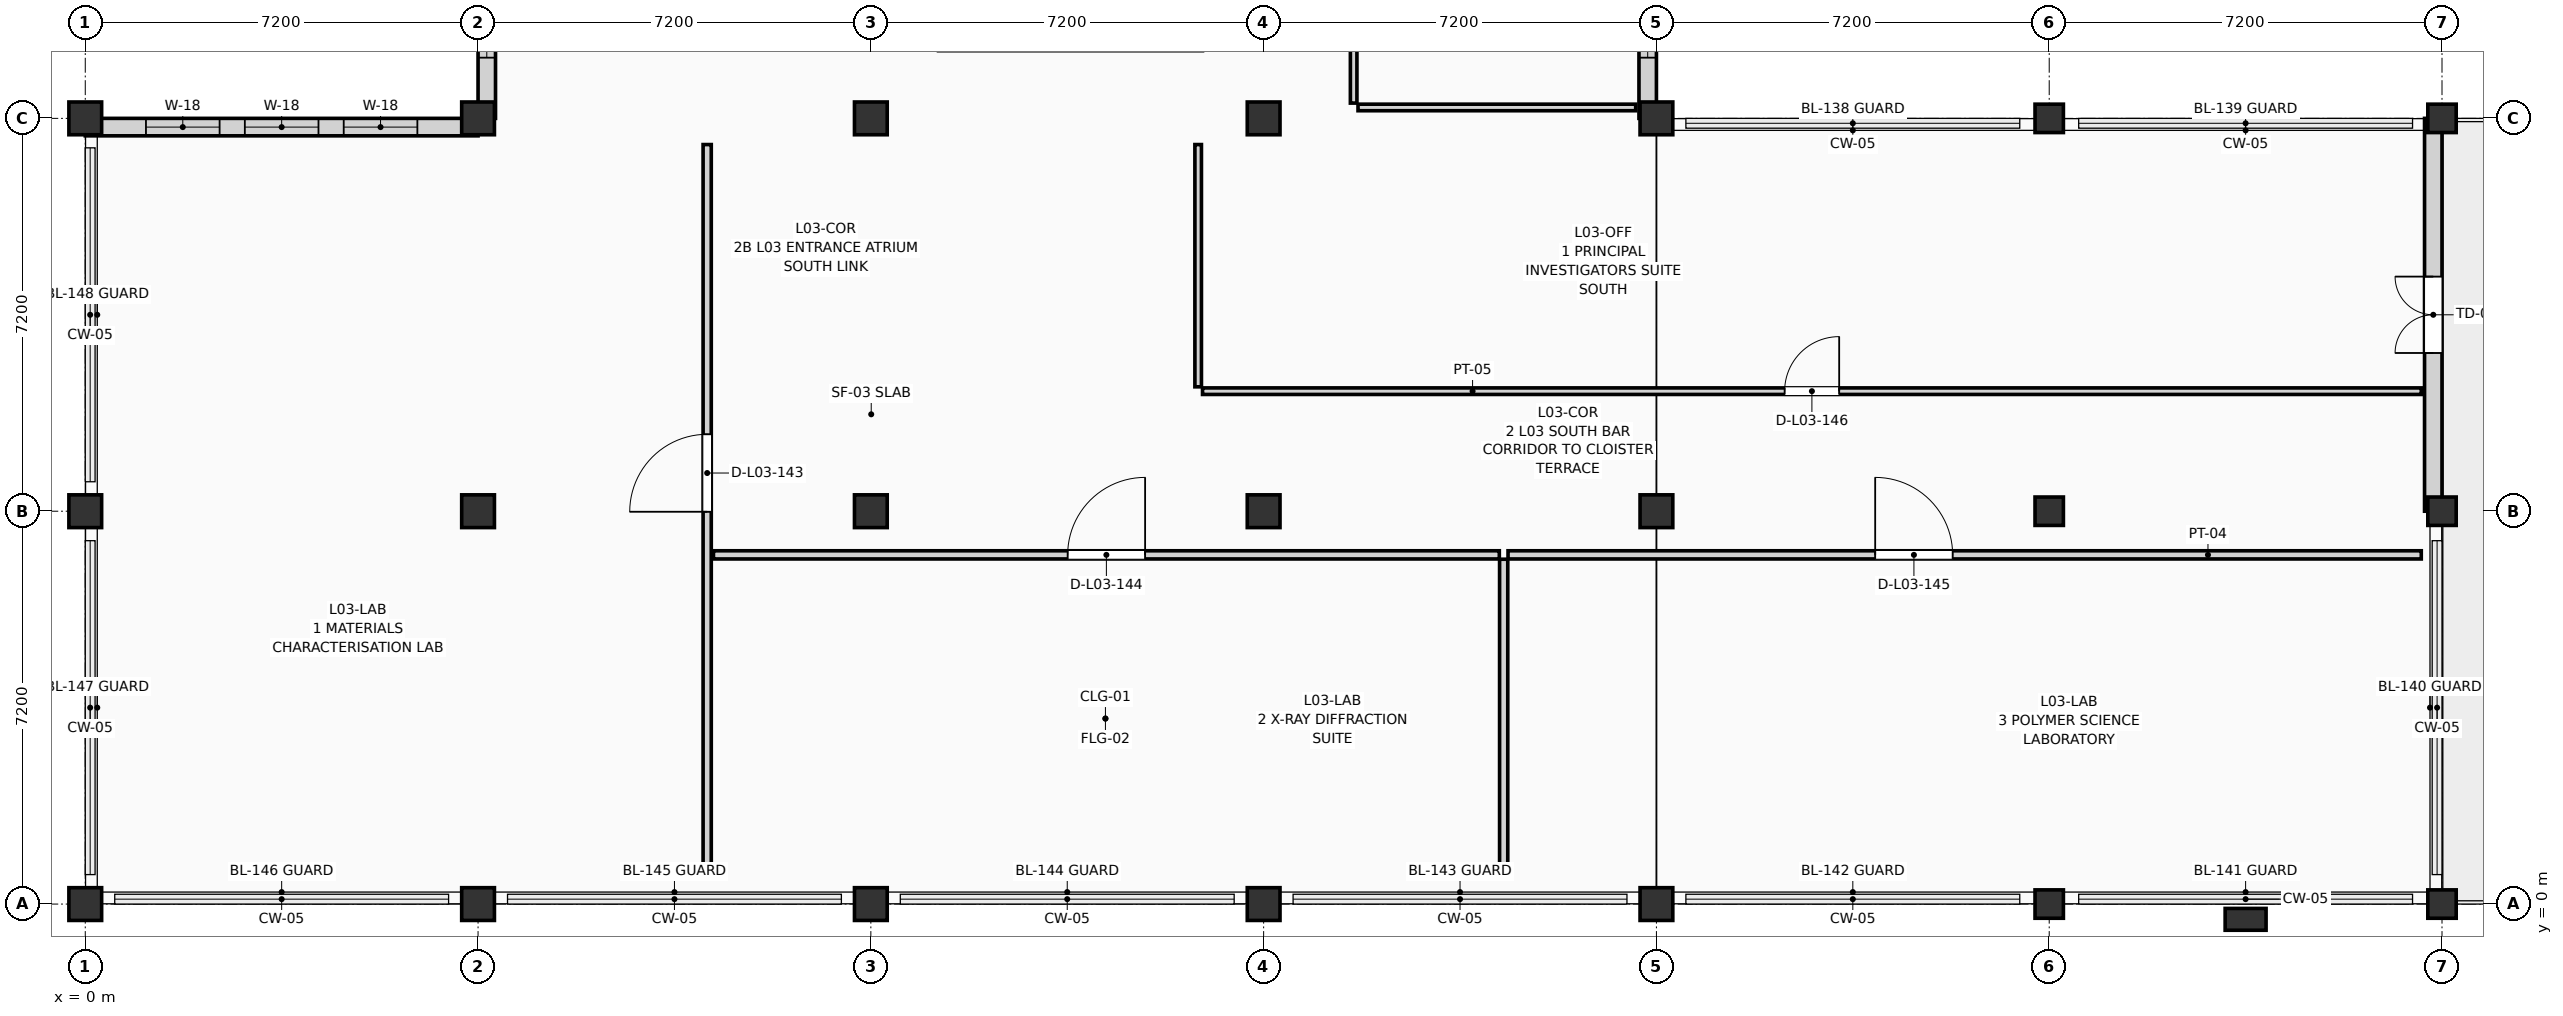
"""IFC4 building model, lengths in metres.
Left out: names, types, materials, properties, quantities, classifications, styles, units other than length and angle.
Written with IfcOpenShell. Run it as: python <this file> out.ifc"""

import sys

from ifc_helpers import new_model, si_unit, direction, frame, frame_2d, origin, origin_2d, place, context, subcontext, project, spatial, rectangle, extrude, element, fill, save


model = new_model("IFC4")
c1 = context("Model", 3, precision=1e-05, world=origin(), true_north=direction((0.0, 1.0)))
c2 = subcontext(c1, "Body", "Model", "MODEL_VIEW")
j1 = project(units=[si_unit("LENGTHUNIT", "METRE"), si_unit("PLANEANGLEUNIT", "RADIAN")], contexts=[c1])
p1 = place(None, origin())
s1 = spatial("IfcSite", under=j1, at=p1, CompositionType="ELEMENT")
p2 = place(p1, origin())
s2 = spatial("IfcBuilding", under=s1, at=p2, CompositionType="ELEMENT")
p3 = place(p2, frame((0.0, 0.0, 12.15)))
s3 = spatial("IfcBuildingStorey", under=s2, at=p3, CompositionType="ELEMENT", Elevation=12.15)
for number, where, z_axis, x_axis in (
    (1, (0.0, 0.0, 0.0), (0.0, 0.0, 1.0), (1.0, 0.0, 0.0)),
    (2, (0.0, 7.2, 0.0), (0.0, 0.0, 1.0), (1.0, 0.0, 0.0)),
    (3, (0.0, 14.4, 0.0), (0.0, 0.0, 1.0), (1.0, 0.0, 0.0)),
    (4, (7.2, 0.0, 0.0), (0.0, 0.0, 1.0), (1.0, 0.0, 0.0)),
    (5, (7.2, 7.2, 0.0), (0.0, 0.0, 1.0), (1.0, 0.0, 0.0)),
    (6, (7.2, 14.4, 0.0), (0.0, 0.0, 1.0), (1.0, 0.0, 0.0)),
    (7, (14.4, 0.0, 0.0), (0.0, 0.0, 1.0), (1.0, 0.0, 0.0)),
    (8, (14.4, 7.2, 0.0), (0.0, 0.0, 1.0), (1.0, 0.0, 0.0)),
    (9, (14.4, 14.4, 0.0), (0.0, 0.0, 1.0), (1.0, 0.0, 0.0)),
    (10, (21.6, 0.0, 0.0), (0.0, 0.0, 1.0), (1.0, 0.0, 0.0)),
    (11, (21.6, 7.2, 0.0), (0.0, 0.0, 1.0), (1.0, 0.0, 0.0)),
    (12, (21.6, 14.4, 0.0), (0.0, 0.0, 1.0), (1.0, 0.0, 0.0)),
    (13, (28.8, 0.0, 0.0), (0.0, 0.0, 1.0), (1.0, 0.0, 0.0)),
    (14, (28.8, 7.2, 0.0), (0.0, 0.0, 1.0), (1.0, 0.0, 0.0)),
    (15, (28.8, 14.4, 0.0), (0.0, 0.0, 1.0), (1.0, 0.0, 0.0)),
):
    element("IfcColumn", number, at=place(p3, frame(where, z_axis=z_axis, x_axis=x_axis)), inside=s3, PredefinedType="COLUMN", context=c2, shape_type="SweptSolid", body=[
        extrude(rectangle(XDim=0.6, YDim=0.6, at=origin_2d()), origin(), (0.0, 0.0, 1.0), 3.6),
    ])
for number, where, z_axis, x_axis in (
    (16, (36.0, 0.0, 0.0), (0.0, 0.0, 1.0), (1.0, 0.0, 0.0)),
    (17, (36.0, 7.2, 0.0), (0.0, 0.0, 1.0), (1.0, 0.0, 0.0)),
    (18, (36.0, 14.4, 0.0), (0.0, 0.0, 1.0), (1.0, 0.0, 0.0)),
    (19, (43.2, 0.0, 0.0), (0.0, 0.0, 1.0), (1.0, 0.0, 0.0)),
    (20, (43.2, 7.2, 0.0), (0.0, 0.0, 1.0), (1.0, 0.0, 0.0)),
    (21, (43.2, 14.4, 0.0), (0.0, 0.0, 1.0), (1.0, 0.0, 0.0)),
):
    element("IfcColumn", number, at=place(p3, frame(where, z_axis=z_axis, x_axis=x_axis)), inside=s3, PredefinedType="COLUMN", context=c2, shape_type="SweptSolid", body=[
        extrude(rectangle(XDim=0.52, YDim=0.52, at=origin_2d()), origin(), (0.0, 0.0, 1.0), 3.6),
    ])
p4 = place(p3, frame((39.6, -0.28, 0.0), z_axis=(0.0, 0.0, 1.0), x_axis=(0.0, 1.0, 0.0)))
e22 = element("IfcColumn", 22, at=p4, inside=s3, PredefinedType="PILASTER", context=c2, shape_type="SweptSolid", body=[
    extrude(rectangle(XDim=0.4, YDim=0.75, at=origin_2d()), origin(), (0.0, 0.0, 1.0), 3.6),
])
p5 = place(p3, frame((7.36, 14.4, 0.0), z_axis=(0.0, 0.0, 1.0), x_axis=(0.0, 1.0, 0.0)))
e23 = element("IfcWall", 23, at=p5, inside=s3, PredefinedType="SOLIDWALL", context=c2, shape_type="SweptSolid", body=[
    extrude(rectangle(XDim=7.2, YDim=0.32, at=frame_2d((3.6, 0.0))), origin(), (0.0, 0.0, 1.0), 2.84),
])
p6 = place(p5, frame((1.113, 0.0, 0.18)))
e24 = element("IfcOpeningElement", 24, at=p6, cuts=e23, PredefinedType="OPENING", context=c2, shape_type="SweptSolid", body=[
    extrude(rectangle(XDim=1.35, YDim=2.45, at=frame_2d((0.675, 1.225))), frame((0.0, 0.172, 0.0), z_axis=(0.0, -1.0, 0.0), x_axis=(1.0, 0.0, 0.0)), (0.0, 0.0, 1.0), 0.344),
])
p7 = place(p5, frame((2.925, 0.0, 0.18)))
e25 = element("IfcOpeningElement", 25, at=p7, cuts=e23, PredefinedType="OPENING", context=c2, shape_type="SweptSolid", body=[
    extrude(rectangle(XDim=1.35, YDim=2.45, at=frame_2d((0.675, 1.225))), frame((0.0, 0.172, 0.0), z_axis=(0.0, -1.0, 0.0), x_axis=(1.0, 0.0, 0.0)), (0.0, 0.0, 1.0), 0.344),
])
p8 = place(p5, frame((4.738, 0.0, 0.18)))
e26 = element("IfcOpeningElement", 26, at=p8, cuts=e23, PredefinedType="OPENING", context=c2, shape_type="SweptSolid", body=[
    extrude(rectangle(XDim=1.35, YDim=2.45, at=frame_2d((0.675, 1.225))), frame((0.0, 0.172, 0.0), z_axis=(0.0, -1.0, 0.0), x_axis=(1.0, 0.0, 0.0)), (0.0, 0.0, 1.0), 0.344),
])
p9 = place(p3, frame((28.64, 14.4, 0.0), z_axis=(0.0, 0.0, 1.0), x_axis=(0.0, 1.0, 0.0)))
e27 = element("IfcWall", 27, at=p9, inside=s3, PredefinedType="SOLIDWALL", context=c2, shape_type="SweptSolid", body=[
    extrude(rectangle(XDim=7.2, YDim=0.32, at=frame_2d((3.6, 0.0))), origin(), (0.0, 0.0, 1.0), 2.84),
])
p10 = place(p9, frame((1.113, 0.0, 0.18)))
e28 = element("IfcOpeningElement", 28, at=p10, cuts=e27, PredefinedType="OPENING", context=c2, shape_type="SweptSolid", body=[
    extrude(rectangle(XDim=1.35, YDim=2.45, at=frame_2d((0.675, 1.225))), frame((0.0, 0.172, 0.0), z_axis=(0.0, -1.0, 0.0), x_axis=(1.0, 0.0, 0.0)), (0.0, 0.0, 1.0), 0.344),
])
p11 = place(p9, frame((2.925, 0.0, 0.18)))
e29 = element("IfcOpeningElement", 29, at=p11, cuts=e27, PredefinedType="OPENING", context=c2, shape_type="SweptSolid", body=[
    extrude(rectangle(XDim=1.35, YDim=2.45, at=frame_2d((0.675, 1.225))), frame((0.0, 0.172, 0.0), z_axis=(0.0, -1.0, 0.0), x_axis=(1.0, 0.0, 0.0)), (0.0, 0.0, 1.0), 0.344),
])
p12 = place(p9, frame((4.738, 0.0, 0.18)))
e30 = element("IfcOpeningElement", 30, at=p12, cuts=e27, PredefinedType="OPENING", context=c2, shape_type="SweptSolid", body=[
    extrude(rectangle(XDim=1.35, YDim=2.45, at=frame_2d((0.675, 1.225))), frame((0.0, 0.172, 0.0), z_axis=(0.0, -1.0, 0.0), x_axis=(1.0, 0.0, 0.0)), (0.0, 0.0, 1.0), 0.344),
])
p13 = place(p3, frame((43.04, 7.2, 0.0), z_axis=(0.0, 0.0, 1.0), x_axis=(0.0, 1.0, 0.0)))
e31 = element("IfcWall", 31, at=p13, inside=s3, PredefinedType="SOLIDWALL", context=c2, shape_type="SweptSolid", body=[
    extrude(rectangle(XDim=7.2, YDim=0.32, at=frame_2d((3.6, 0.0))), origin(), (0.0, 0.0, 1.0), 2.84),
])
p14 = place(p13, frame((2.9, 0.0, 0.0)))
e32 = element("IfcOpeningElement", 32, at=p14, cuts=e31, PredefinedType="OPENING", context=c2, shape_type="SweptSolid", body=[
    extrude(rectangle(XDim=1.4, YDim=2.2, at=frame_2d((0.7, 1.1))), frame((0.0, 0.172, 0.0), z_axis=(0.0, -1.0, 0.0), x_axis=(1.0, 0.0, 0.0)), (0.0, 0.0, 1.0), 0.344),
])
p15 = place(p3, frame((0.0, 14.24, 0.0), z_axis=(0.0, 0.0, 1.0), x_axis=(1.0, 0.0, 0.0)))
e33 = element("IfcWall", 33, at=p15, inside=s3, PredefinedType="SOLIDWALL", context=c2, shape_type="SweptSolid", body=[
    extrude(rectangle(XDim=7.2, YDim=0.32, at=frame_2d((3.6, 0.0))), origin(), (0.0, 0.0, 1.0), 2.84),
])
p16 = place(p15, frame((1.113, 0.0, 0.18)))
e34 = element("IfcOpeningElement", 34, at=p16, cuts=e33, PredefinedType="OPENING", context=c2, shape_type="SweptSolid", body=[
    extrude(rectangle(XDim=1.35, YDim=2.45, at=frame_2d((0.675, 1.225))), frame((0.0, 0.172, 0.0), z_axis=(0.0, -1.0, 0.0), x_axis=(1.0, 0.0, 0.0)), (0.0, 0.0, 1.0), 0.344),
])
p17 = place(p15, frame((2.925, 0.0, 0.18)))
e35 = element("IfcOpeningElement", 35, at=p17, cuts=e33, PredefinedType="OPENING", context=c2, shape_type="SweptSolid", body=[
    extrude(rectangle(XDim=1.35, YDim=2.45, at=frame_2d((0.675, 1.225))), frame((0.0, 0.172, 0.0), z_axis=(0.0, -1.0, 0.0), x_axis=(1.0, 0.0, 0.0)), (0.0, 0.0, 1.0), 0.344),
])
p18 = place(p15, frame((4.738, 0.0, 0.18)))
e36 = element("IfcOpeningElement", 36, at=p18, cuts=e33, PredefinedType="OPENING", context=c2, shape_type="SweptSolid", body=[
    extrude(rectangle(XDim=1.35, YDim=2.45, at=frame_2d((0.675, 1.225))), frame((0.0, 0.172, 0.0), z_axis=(0.0, -1.0, 0.0), x_axis=(1.0, 0.0, 0.0)), (0.0, 0.0, 1.0), 0.344),
])
p19 = place(p3, frame((11.4, 0.48, 0.0), z_axis=(0.0, 0.0, 1.0), x_axis=(0.0, 1.0, 0.0)))
e37 = element("IfcWall", 37, at=p19, inside=s3, PredefinedType="PARTITIONING", context=c2, shape_type="SweptSolid", body=[
    extrude(rectangle(XDim=13.44, YDim=0.15, at=frame_2d((6.72, 0.0))), origin(), (0.0, 0.0, 1.0), 3.375),
])
p20 = place(p19, frame((6.71, 0.0, 0.0)))
e38 = element("IfcOpeningElement", 38, at=p20, cuts=e37, PredefinedType="OPENING", context=c2, shape_type="SweptSolid", body=[
    extrude(rectangle(XDim=1.42, YDim=2.22, at=frame_2d((0.71, 1.11))), frame((0.0, 0.087, 0.0), z_axis=(0.0, -1.0, 0.0), x_axis=(1.0, 0.0, 0.0)), (0.0, 0.0, 1.0), 0.174),
])
p21 = place(p3, frame((26.0, 0.48, 0.0), z_axis=(0.0, 0.0, 1.0), x_axis=(0.0, 1.0, 0.0)))
e39 = element("IfcWall", 39, at=p21, inside=s3, PredefinedType="PARTITIONING", context=c2, shape_type="SweptSolid", body=[
    extrude(rectangle(XDim=5.84, YDim=0.15, at=frame_2d((2.92, 0.0))), origin(), (0.0, 0.0, 1.0), 3.375),
])
p22 = place(p3, frame((11.515, 6.4, 0.0), z_axis=(0.0, 0.0, 1.0), x_axis=(1.0, 0.0, 0.0)))
e40 = element("IfcWall", 40, at=p22, inside=s3, PredefinedType="PARTITIONING", context=c2, shape_type="SweptSolid", body=[
    extrude(rectangle(XDim=14.405, YDim=0.15, at=frame_2d((7.203, 0.0))), origin(), (0.0, 0.0, 1.0), 3.375),
])
p23 = place(p22, frame((6.492, 0.0, 0.0)))
e41 = element("IfcOpeningElement", 41, at=p23, cuts=e40, PredefinedType="OPENING", context=c2, shape_type="SweptSolid", body=[
    extrude(rectangle(XDim=1.42, YDim=2.22, at=frame_2d((0.71, 1.11))), frame((0.0, 0.087, 0.0), z_axis=(0.0, -1.0, 0.0), x_axis=(1.0, 0.0, 0.0)), (0.0, 0.0, 1.0), 0.174),
])
p24 = place(p3, frame((26.08, 6.4, 0.0), z_axis=(0.0, 0.0, 1.0), x_axis=(1.0, 0.0, 0.0)))
e42 = element("IfcWall", 42, at=p24, inside=s3, PredefinedType="PARTITIONING", context=c2, shape_type="SweptSolid", body=[
    extrude(rectangle(XDim=16.74, YDim=0.15, at=frame_2d((8.37, 0.0))), origin(), (0.0, 0.0, 1.0), 3.375),
])
p25 = place(p24, frame((6.73, 0.0, 0.0)))
e43 = element("IfcOpeningElement", 43, at=p25, cuts=e42, PredefinedType="OPENING", context=c2, shape_type="SweptSolid", body=[
    extrude(rectangle(XDim=1.42, YDim=2.22, at=frame_2d((0.71, 1.11))), frame((0.0, 0.087, 0.0), z_axis=(0.0, -1.0, 0.0), x_axis=(1.0, 0.0, 0.0)), (0.0, 0.0, 1.0), 0.174),
])
p26 = place(p3, frame((20.4, 9.48, 0.0), z_axis=(0.0, 0.0, 1.0), x_axis=(0.0, 1.0, 0.0)))
e44 = element("IfcWall", 44, at=p26, inside=s3, PredefinedType="PARTITIONING", context=c2, shape_type="SweptSolid", body=[
    extrude(rectangle(XDim=4.44, YDim=0.12, at=frame_2d((2.22, 0.0))), origin(), (0.0, 0.0, 1.0), 3.375),
])
p27 = place(p3, frame((20.48, 9.4, 0.0), z_axis=(0.0, 0.0, 1.0), x_axis=(1.0, 0.0, 0.0)))
e45 = element("IfcWall", 45, at=p27, inside=s3, PredefinedType="PARTITIONING", context=c2, shape_type="SweptSolid", body=[
    extrude(rectangle(XDim=22.34, YDim=0.12, at=frame_2d((11.17, 0.0))), origin(), (0.0, 0.0, 1.0), 3.375),
])
p28 = place(p27, frame((10.67, 0.0, 0.0)))
e46 = element("IfcOpeningElement", 46, at=p28, cuts=e45, PredefinedType="OPENING", context=c2, shape_type="SweptSolid", body=[
    extrude(rectangle(XDim=1.0, YDim=2.15, at=frame_2d((0.5, 1.075))), frame((0.0, 0.072, 0.0), z_axis=(0.0, -1.0, 0.0), x_axis=(1.0, 0.0, 0.0)), (0.0, 0.0, 1.0), 0.144),
])
p29 = place(p3, frame((23.25, 14.68, 0.0), z_axis=(0.0, 0.0, 1.0), x_axis=(0.0, 1.0, 0.0)))
e47 = element("IfcWall", 47, at=p29, inside=s3, PredefinedType="PARTITIONING", context=c2, shape_type="SweptSolid", body=[
    extrude(rectangle(XDim=6.84, YDim=0.12, at=frame_2d((3.42, 0.0))), origin(), (0.0, 0.0, 1.0), 3.375),
])
p30 = place(p29, frame((2.79, 0.0, 0.0)))
e48 = element("IfcOpeningElement", 48, at=p30, cuts=e47, PredefinedType="OPENING", context=c2, shape_type="SweptSolid", body=[
    extrude(rectangle(XDim=1.26, YDim=2.18, at=frame_2d((0.63, 1.09))), frame((0.0, 0.072, 0.0), z_axis=(0.0, -1.0, 0.0), x_axis=(1.0, 0.0, 0.0)), (0.0, 0.0, 1.0), 0.144),
])
p31 = place(p3, frame((23.33, 14.6, 0.0), z_axis=(0.0, 0.0, 1.0), x_axis=(1.0, 0.0, 0.0)))
e49 = element("IfcWall", 49, at=p31, inside=s3, PredefinedType="PARTITIONING", context=c2, shape_type="SweptSolid", body=[
    extrude(rectangle(XDim=5.09, YDim=0.12, at=frame_2d((2.545, 0.0))), origin(), (0.0, 0.0, 1.0), 2.595),
])
p32 = place(p6, origin())
e50 = element("IfcWindow", 50, at=p32, inside=s3, PartitioningType="SINGLE_PANEL", PredefinedType="WINDOW", context=c2, shape_type="SweptSolid", body=[
    extrude(rectangle(XDim=1.35, YDim=2.45, at=frame_2d((0.675, 1.225))), frame((0.0, 0.03, 0.0), z_axis=(0.0, -1.0, 0.0), x_axis=(1.0, 0.0, 0.0)), (0.0, 0.0, 1.0), 0.06),
])
fill(e24, e50)
p33 = place(p10, origin())
e51 = element("IfcWindow", 51, at=p33, inside=s3, PartitioningType="SINGLE_PANEL", PredefinedType="WINDOW", context=c2, shape_type="SweptSolid", body=[
    extrude(rectangle(XDim=1.35, YDim=2.45, at=frame_2d((0.675, 1.225))), frame((0.0, 0.03, 0.0), z_axis=(0.0, -1.0, 0.0), x_axis=(1.0, 0.0, 0.0)), (0.0, 0.0, 1.0), 0.06),
])
fill(e28, e51)
p34 = place(p14, origin())
e52 = element("IfcDoor", 52, at=p34, inside=s3, OperationType="DOUBLE_DOOR_SINGLE_SWING", PredefinedType="DOOR", context=c2, shape_type="SweptSolid", body=[
    extrude(rectangle(XDim=1.4, YDim=2.2, at=frame_2d((0.7, 1.1))), frame((0.0, 0.025, 0.0), z_axis=(0.0, -1.0, 0.0), x_axis=(1.0, 0.0, 0.0)), (0.0, 0.0, 1.0), 0.05),
])
fill(e32, e52)
p35 = place(p16, origin())
e53 = element("IfcWindow", 53, at=p35, inside=s3, PartitioningType="SINGLE_PANEL", PredefinedType="WINDOW", context=c2, shape_type="SweptSolid", body=[
    extrude(rectangle(XDim=1.35, YDim=2.45, at=frame_2d((0.675, 1.225))), frame((0.0, 0.03, 0.0), z_axis=(0.0, -1.0, 0.0), x_axis=(1.0, 0.0, 0.0)), (0.0, 0.0, 1.0), 0.06),
])
fill(e34, e53)
p36 = place(p17, origin())
e54 = element("IfcWindow", 54, at=p36, inside=s3, PartitioningType="SINGLE_PANEL", PredefinedType="WINDOW", context=c2, shape_type="SweptSolid", body=[
    extrude(rectangle(XDim=1.35, YDim=2.45, at=frame_2d((0.675, 1.225))), frame((0.0, 0.03, 0.0), z_axis=(0.0, -1.0, 0.0), x_axis=(1.0, 0.0, 0.0)), (0.0, 0.0, 1.0), 0.06),
])
fill(e35, e54)
p37 = place(p18, origin())
e55 = element("IfcWindow", 55, at=p37, inside=s3, PartitioningType="SINGLE_PANEL", PredefinedType="WINDOW", context=c2, shape_type="SweptSolid", body=[
    extrude(rectangle(XDim=1.35, YDim=2.45, at=frame_2d((0.675, 1.225))), frame((0.0, 0.03, 0.0), z_axis=(0.0, -1.0, 0.0), x_axis=(1.0, 0.0, 0.0)), (0.0, 0.0, 1.0), 0.06),
])
fill(e36, e55)
p38 = place(p20, origin())
e56 = element("IfcDoor", 56, at=p38, inside=s3, OperationType="SINGLE_SWING_LEFT", PredefinedType="DOOR", context=c2, shape_type="SweptSolid", body=[
    extrude(rectangle(XDim=1.42, YDim=2.22, at=frame_2d((0.71, 1.11))), frame((0.0, 0.025, 0.0), z_axis=(0.0, -1.0, 0.0), x_axis=(1.0, 0.0, 0.0)), (0.0, 0.0, 1.0), 0.05),
])
fill(e38, e56)
p39 = place(p23, origin())
e57 = element("IfcDoor", 57, at=p39, inside=s3, OperationType="SINGLE_SWING_RIGHT", PredefinedType="DOOR", context=c2, shape_type="SweptSolid", body=[
    extrude(rectangle(XDim=1.42, YDim=2.22, at=frame_2d((0.71, 1.11))), frame((0.0, 0.025, 0.0), z_axis=(0.0, -1.0, 0.0), x_axis=(1.0, 0.0, 0.0)), (0.0, 0.0, 1.0), 0.05),
])
fill(e41, e57)
p40 = place(p25, origin())
e58 = element("IfcDoor", 58, at=p40, inside=s3, OperationType="SINGLE_SWING_LEFT", PredefinedType="DOOR", context=c2, shape_type="SweptSolid", body=[
    extrude(rectangle(XDim=1.42, YDim=2.22, at=frame_2d((0.71, 1.11))), frame((0.0, 0.025, 0.0), z_axis=(0.0, -1.0, 0.0), x_axis=(1.0, 0.0, 0.0)), (0.0, 0.0, 1.0), 0.05),
])
fill(e43, e58)
p41 = place(p28, origin())
e59 = element("IfcDoor", 59, at=p41, inside=s3, OperationType="SINGLE_SWING_RIGHT", PredefinedType="DOOR", context=c2, shape_type="SweptSolid", body=[
    extrude(rectangle(XDim=1.0, YDim=2.15, at=frame_2d((0.5, 1.075))), frame((0.0, 0.025, 0.0), z_axis=(0.0, -1.0, 0.0), x_axis=(1.0, 0.0, 0.0)), (0.0, 0.0, 1.0), 0.05),
])
fill(e46, e59)
save(model, sys.argv[1])
